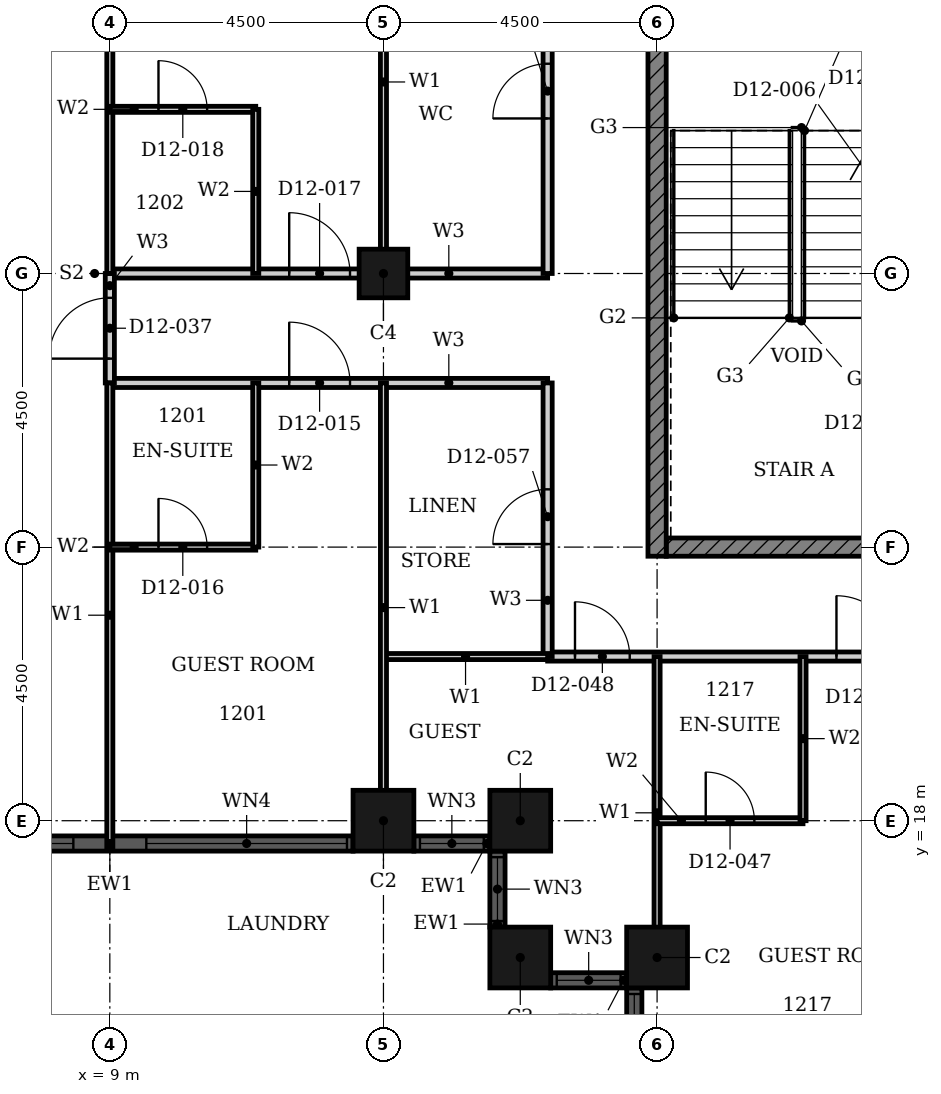
"""IFC4 building model, lengths in metres.
Left out: names, types, materials, properties, quantities, classifications, styles, units other than length and angle.
Written with IfcOpenShell. Run it as: python <this file> out.ifc"""

import sys

from ifc_helpers import new_model, si_unit, direction, frame, frame_2d, origin, origin_2d, place, context, subcontext, project, spatial, rectangle, hollow_rectangle, extrude, element, fill, save


model = new_model("IFC4")
c1 = context("Model", 3, precision=1e-05, world=origin(), true_north=direction((0.0, 1.0)))
c2 = subcontext(c1, "Body", "Model", "MODEL_VIEW")
j1 = project(units=[si_unit("LENGTHUNIT", "METRE"), si_unit("PLANEANGLEUNIT", "RADIAN")], contexts=[c1])
p1 = place(None, origin())
s1 = spatial("IfcSite", under=j1, at=p1, CompositionType="ELEMENT")
p2 = place(p1, origin())
s2 = spatial("IfcBuilding", under=s1, at=p2, CompositionType="ELEMENT")
p3 = place(p2, frame((0.0, 0.0, 56.4)))
s3 = spatial("IfcBuildingStorey", under=s2, at=p3, CompositionType="ELEMENT", Elevation=56.4)
for number, where, z_axis, x_axis in (
    (1, (13.5, 18.0, 0.0), (0.0, 0.0, 1.0), (1.0, 0.0, 0.0)),
    (2, (15.75, 18.0, 0.0), (0.0, 0.0, 1.0), (1.0, 0.0, 0.0)),
    (3, (15.75, 15.75, 0.0), (0.0, 0.0, 1.0), (1.0, 0.0, 0.0)),
    (4, (18.0, 15.75, 0.0), (0.0, 0.0, 1.0), (1.0, 0.0, 0.0)),
):
    element("IfcColumn", number, at=place(p3, frame(where, z_axis=z_axis, x_axis=x_axis)), inside=s3, PredefinedType="COLUMN", context=c2, shape_type="SweptSolid", body=[
        extrude(hollow_rectangle(XDim=1.0, YDim=1.0, WallThickness=0.032, at=origin_2d()), origin(), (0.0, 0.0, 1.0), 3.6),
    ])
p4 = place(p3, frame((13.5, 27.0, 0.0), z_axis=(0.0, 0.0, 1.0), x_axis=(1.0, 0.0, 0.0)))
e5 = element("IfcColumn", 5, at=p4, inside=s3, PredefinedType="COLUMN", context=c2, shape_type="SweptSolid", body=[
    extrude(hollow_rectangle(XDim=0.8, YDim=0.8, WallThickness=0.025, at=origin_2d()), origin(), (0.0, 0.0, 1.0), 3.6),
])
p5 = place(p3, frame((5.0, 17.625, 0.0), z_axis=(0.0, 0.0, 1.0), x_axis=(1.0, 0.0, 0.0)))
e6 = element("IfcWall", 6, at=p5, inside=s3, PredefinedType="SOLIDWALL", context=c2, shape_type="SweptSolid", body=[
    extrude(rectangle(XDim=8.0, YDim=0.25, at=frame_2d((4.0, 0.0))), origin(), (0.0, 0.0, 1.0), 3.6),
])
p6 = place(p5, frame((0.1, 0.0, 0.9)))
e7 = element("IfcOpeningElement", 7, at=p6, cuts=e6, PredefinedType="OPENING", context=c2, shape_type="SweptSolid", body=[
    extrude(rectangle(XDim=3.3, YDim=2.08, at=frame_2d((1.65, 1.04))), frame((0.0, 0.135, 0.0), z_axis=(0.0, -1.0, 0.0), x_axis=(1.0, 0.0, 0.0)), (0.0, 0.0, 1.0), 0.27),
])
p7 = place(p5, frame((4.6, 0.0, 0.9)))
e8 = element("IfcOpeningElement", 8, at=p7, cuts=e6, PredefinedType="OPENING", context=c2, shape_type="SweptSolid", body=[
    extrude(rectangle(XDim=3.3, YDim=2.08, at=frame_2d((1.65, 1.04))), frame((0.0, 0.135, 0.0), z_axis=(0.0, -1.0, 0.0), x_axis=(1.0, 0.0, 0.0)), (0.0, 0.0, 1.0), 0.27),
])
p8 = place(p3, frame((14.0, 17.625, 0.0), z_axis=(0.0, 0.0, 1.0), x_axis=(1.0, 0.0, 0.0)))
e9 = element("IfcWall", 9, at=p8, inside=s3, PredefinedType="SOLIDWALL", context=c2, shape_type="SweptSolid", body=[
    extrude(rectangle(XDim=1.25, YDim=0.25, at=frame_2d((0.625, 0.0))), origin(), (0.0, 0.0, 1.0), 3.6),
])
p9 = place(p8, frame((0.1, 0.0, 0.9)))
e10 = element("IfcOpeningElement", 10, at=p9, cuts=e9, PredefinedType="OPENING", context=c2, shape_type="SweptSolid", body=[
    extrude(rectangle(XDim=1.05, YDim=2.08, at=frame_2d((0.525, 1.04))), frame((0.0, 0.135, 0.0), z_axis=(0.0, -1.0, 0.0), x_axis=(1.0, 0.0, 0.0)), (0.0, 0.0, 1.0), 0.27),
])
p10 = place(p3, frame((15.375, 17.5, 0.0), z_axis=(0.0, 0.0, 1.0), x_axis=(0.0, -1.0, 0.0)))
e11 = element("IfcWall", 11, at=p10, inside=s3, PredefinedType="SOLIDWALL", context=c2, shape_type="SweptSolid", body=[
    extrude(rectangle(XDim=1.25, YDim=0.25, at=frame_2d((0.625, 0.0))), origin(), (0.0, 0.0, 1.0), 3.6),
])
p11 = place(p10, frame((0.1, 0.0, 0.9)))
e12 = element("IfcOpeningElement", 12, at=p11, cuts=e11, PredefinedType="OPENING", context=c2, shape_type="SweptSolid", body=[
    extrude(rectangle(XDim=1.05, YDim=2.08, at=frame_2d((0.525, 1.04))), frame((0.0, 0.135, 0.0), z_axis=(0.0, -1.0, 0.0), x_axis=(1.0, 0.0, 0.0)), (0.0, 0.0, 1.0), 0.27),
])
p12 = place(p3, frame((16.25, 15.375, 0.0), z_axis=(0.0, 0.0, 1.0), x_axis=(1.0, 0.0, 0.0)))
e13 = element("IfcWall", 13, at=p12, inside=s3, PredefinedType="SOLIDWALL", context=c2, shape_type="SweptSolid", body=[
    extrude(rectangle(XDim=1.25, YDim=0.25, at=frame_2d((0.625, 0.0))), origin(), (0.0, 0.0, 1.0), 3.6),
])
p13 = place(p12, frame((0.1, 0.0, 0.9)))
e14 = element("IfcOpeningElement", 14, at=p13, cuts=e13, PredefinedType="OPENING", context=c2, shape_type="SweptSolid", body=[
    extrude(rectangle(XDim=1.05, YDim=2.08, at=frame_2d((0.525, 1.04))), frame((0.0, 0.135, 0.0), z_axis=(0.0, -1.0, 0.0), x_axis=(1.0, 0.0, 0.0)), (0.0, 0.0, 1.0), 0.27),
])
p14 = place(p3, frame((17.625, 15.25, 0.0), z_axis=(0.0, 0.0, 1.0), x_axis=(0.0, -1.0, 0.0)))
e15 = element("IfcWall", 15, at=p14, inside=s3, PredefinedType="SOLIDWALL", context=c2, shape_type="SweptSolid", body=[
    extrude(rectangle(XDim=1.25, YDim=0.25, at=frame_2d((0.625, 0.0))), origin(), (0.0, 0.0, 1.0), 3.6),
])
p15 = place(p14, frame((0.1, 0.0, 0.9)))
e16 = element("IfcOpeningElement", 16, at=p15, cuts=e15, PredefinedType="OPENING", context=c2, shape_type="SweptSolid", body=[
    extrude(rectangle(XDim=1.05, YDim=2.08, at=frame_2d((0.525, 1.04))), frame((0.0, 0.135, 0.0), z_axis=(0.0, -1.0, 0.0), x_axis=(1.0, 0.0, 0.0)), (0.0, 0.0, 1.0), 0.27),
])
p16 = place(p3, frame((18.15, 22.5, 0.0), z_axis=(0.0, 0.0, 1.0), x_axis=(1.0, 0.0, 0.0)))
e17 = element("IfcWall", 17, at=p16, inside=s3, PredefinedType="SHEAR", context=c2, shape_type="SweptSolid", body=[
    extrude(rectangle(XDim=4.225, YDim=0.3, at=frame_2d((2.113, 0.0))), origin(), (0.0, 0.0, 1.0), 3.3),
])
p17 = place(p3, frame((18.0, 22.35, 0.0), z_axis=(0.0, 0.0, 1.0), x_axis=(0.0, 1.0, 0.0)))
e18 = element("IfcWall", 18, at=p17, inside=s3, PredefinedType="SHEAR", context=c2, shape_type="SweptSolid", body=[
    extrude(rectangle(XDim=9.3, YDim=0.3, at=frame_2d((4.65, 0.0))), origin(), (0.0, 0.0, 1.0), 3.3),
])
p18 = place(p3, frame((16.2, 20.7, 0.0), z_axis=(0.0, 0.0, 1.0), x_axis=(1.0, 0.0, 0.0)))
e19 = element("IfcWall", 19, at=p18, inside=s3, PredefinedType="PARTITIONING", context=c2, shape_type="SweptSolid", body=[
    extrude(rectangle(XDim=13.5, YDim=0.15, at=frame_2d((6.75, 0.0))), origin(), (0.0, 0.0, 1.0), 3.3),
])
p19 = place(p18, frame((4.75, 0.0, 0.0)))
e20 = element("IfcOpeningElement", 20, at=p19, cuts=e19, PredefinedType="OPENING", context=c2, shape_type="SweptSolid", body=[
    extrude(rectangle(XDim=1.0, YDim=2.1, at=frame_2d((0.5, 1.05))), frame((0.0, 0.085, 0.0), z_axis=(0.0, -1.0, 0.0), x_axis=(1.0, 0.0, 0.0)), (0.0, 0.0, 1.0), 0.17),
])
p20 = place(p18, frame((0.45, 0.0, 0.0)))
e21 = element("IfcOpeningElement", 21, at=p20, cuts=e19, PredefinedType="OPENING", context=c2, shape_type="SweptSolid", body=[
    extrude(rectangle(XDim=0.9, YDim=2.1, at=frame_2d((0.45, 1.05))), frame((0.0, 0.085, 0.0), z_axis=(0.0, -1.0, 0.0), x_axis=(1.0, 0.0, 0.0)), (0.0, 0.0, 1.0), 0.17),
])
p21 = place(p18, frame((9.45, 0.0, 0.0)))
e22 = element("IfcOpeningElement", 22, at=p21, cuts=e19, PredefinedType="OPENING", context=c2, shape_type="SweptSolid", body=[
    extrude(rectangle(XDim=0.9, YDim=2.1, at=frame_2d((0.45, 1.05))), frame((0.0, 0.085, 0.0), z_axis=(0.0, -1.0, 0.0), x_axis=(1.0, 0.0, 0.0)), (0.0, 0.0, 1.0), 0.17),
])
p22 = place(p3, frame((9.0, 25.2, 0.0), z_axis=(0.0, 0.0, 1.0), x_axis=(1.0, 0.0, 0.0)))
e23 = element("IfcWall", 23, at=p22, inside=s3, PredefinedType="PARTITIONING", context=c2, shape_type="SweptSolid", body=[
    extrude(rectangle(XDim=7.2, YDim=0.15, at=frame_2d((3.6, 0.0))), origin(), (0.0, 0.0, 1.0), 3.3),
])
p23 = place(p22, frame((2.95, 0.0, 0.0)))
e24 = element("IfcOpeningElement", 24, at=p23, cuts=e23, PredefinedType="OPENING", context=c2, shape_type="SweptSolid", body=[
    extrude(rectangle(XDim=1.0, YDim=2.1, at=frame_2d((0.5, 1.05))), frame((0.0, 0.085, 0.0), z_axis=(0.0, -1.0, 0.0), x_axis=(1.0, 0.0, 0.0)), (0.0, 0.0, 1.0), 0.17),
])
p24 = place(p3, frame((9.0, 27.0, 0.0), z_axis=(0.0, 0.0, 1.0), x_axis=(1.0, 0.0, 0.0)))
e25 = element("IfcWall", 25, at=p24, inside=s3, PredefinedType="PARTITIONING", context=c2, shape_type="SweptSolid", body=[
    extrude(rectangle(XDim=7.2, YDim=0.15, at=frame_2d((3.6, 0.0))), origin(), (0.0, 0.0, 1.0), 2.58),
])
p25 = place(p24, frame((2.95, 0.0, 0.0)))
e26 = element("IfcOpeningElement", 26, at=p25, cuts=e25, PredefinedType="OPENING", context=c2, shape_type="SweptSolid", body=[
    extrude(rectangle(XDim=1.0, YDim=2.1, at=frame_2d((0.5, 1.05))), frame((0.0, 0.085, 0.0), z_axis=(0.0, -1.0, 0.0), x_axis=(1.0, 0.0, 0.0)), (0.0, 0.0, 1.0), 0.17),
])
p26 = place(p3, frame((16.2, 27.0, 0.0), z_axis=(0.0, 0.0, 1.0), x_axis=(0.0, 1.0, 0.0)))
e27 = element("IfcWall", 27, at=p26, inside=s3, PredefinedType="PARTITIONING", context=c2, shape_type="SweptSolid", body=[
    extrude(rectangle(XDim=6.3, YDim=0.15, at=frame_2d((3.15, 0.0))), origin(), (0.0, 0.0, 1.0), 3.3),
])
p27 = place(p26, frame((2.55, 0.0, 0.0)))
e28 = element("IfcOpeningElement", 28, at=p27, cuts=e27, PredefinedType="OPENING", context=c2, shape_type="SweptSolid", body=[
    extrude(rectangle(XDim=0.9, YDim=2.1, at=frame_2d((0.45, 1.05))), frame((0.0, 0.085, 0.0), z_axis=(0.0, -1.0, 0.0), x_axis=(1.0, 0.0, 0.0)), (0.0, 0.0, 1.0), 0.17),
])
p28 = place(p3, frame((16.2, 20.7, 0.0), z_axis=(0.0, 0.0, 1.0), x_axis=(0.0, 1.0, 0.0)))
e29 = element("IfcWall", 29, at=p28, inside=s3, PredefinedType="PARTITIONING", context=c2, shape_type="SweptSolid", body=[
    extrude(rectangle(XDim=4.5, YDim=0.15, at=frame_2d((2.25, 0.0))), origin(), (0.0, 0.0, 1.0), 3.3),
])
p29 = place(p28, frame((1.85, 0.0, 0.0)))
e30 = element("IfcOpeningElement", 30, at=p29, cuts=e29, PredefinedType="OPENING", context=c2, shape_type="SweptSolid", body=[
    extrude(rectangle(XDim=0.9, YDim=2.1, at=frame_2d((0.45, 1.05))), frame((0.0, 0.085, 0.0), z_axis=(0.0, -1.0, 0.0), x_axis=(1.0, 0.0, 0.0)), (0.0, 0.0, 1.0), 0.17),
])
p30 = place(p3, frame((9.0, 25.2, 0.0), z_axis=(0.0, 0.0, 1.0), x_axis=(0.0, 1.0, 0.0)))
e31 = element("IfcWall", 31, at=p30, inside=s3, PredefinedType="PARTITIONING", context=c2, shape_type="SweptSolid", body=[
    extrude(rectangle(XDim=1.8, YDim=0.15, at=frame_2d((0.9, 0.0))), origin(), (0.0, 0.0, 1.0), 3.3),
])
p31 = place(p30, frame((0.4, 0.0, 0.0)))
e32 = element("IfcOpeningElement", 32, at=p31, cuts=e31, PredefinedType="OPENING", context=c2, shape_type="SweptSolid", body=[
    extrude(rectangle(XDim=1.0, YDim=2.1, at=frame_2d((0.5, 1.05))), frame((0.0, 0.085, 0.0), z_axis=(0.0, -1.0, 0.0), x_axis=(1.0, 0.0, 0.0)), (0.0, 0.0, 1.0), 0.17),
])
p32 = place(p3, frame((13.5, 20.7, 0.0), z_axis=(0.0, 0.0, 1.0), x_axis=(1.0, 0.0, 0.0)))
e33 = element("IfcWall", 33, at=p32, inside=s3, PredefinedType="PARTITIONING", context=c2, shape_type="SweptSolid", body=[
    extrude(rectangle(XDim=2.7, YDim=0.1, at=frame_2d((1.35, 0.0))), origin(), (0.0, 0.0, 1.0), 3.3),
])
p33 = place(p3, frame((13.5, 27.0, 0.0), z_axis=(0.0, 0.0, 1.0), x_axis=(0.0, 1.0, 0.0)))
e34 = element("IfcWall", 34, at=p33, inside=s3, PredefinedType="PARTITIONING", context=c2, shape_type="SweptSolid", body=[
    extrude(rectangle(XDim=6.3, YDim=0.1, at=frame_2d((3.15, 0.0))), origin(), (0.0, 0.0, 1.0), 2.38),
])
p34 = place(p3, frame((13.5, 17.81, 0.0), z_axis=(0.0, 0.0, 1.0), x_axis=(0.0, 1.0, 0.0)))
e35 = element("IfcWall", 35, at=p34, inside=s3, PredefinedType="PARTITIONING", context=c2, shape_type="SweptSolid", body=[
    extrude(rectangle(XDim=7.39, YDim=0.1, at=frame_2d((3.695, 0.0))), origin(), (0.0, 0.0, 1.0), 2.38),
])
p35 = place(p3, frame((18.0, 15.56, 0.0), z_axis=(0.0, 0.0, 1.0), x_axis=(0.0, 1.0, 0.0)))
e36 = element("IfcWall", 36, at=p35, inside=s3, PredefinedType="PARTITIONING", context=c2, shape_type="SweptSolid", body=[
    extrude(rectangle(XDim=5.14, YDim=0.1, at=frame_2d((2.57, 0.0))), origin(), (0.0, 0.0, 1.0), 3.3),
])
p36 = place(p3, frame((9.0, 27.0, 0.0), z_axis=(0.0, 0.0, 1.0), x_axis=(0.0, 1.0, 0.0)))
e37 = element("IfcWall", 37, at=p36, inside=s3, PredefinedType="PARTITIONING", context=c2, shape_type="SweptSolid", body=[
    extrude(rectangle(XDim=9.44, YDim=0.1, at=frame_2d((4.72, 0.0))), origin(), (0.0, 0.0, 1.0), 3.3),
])
p37 = place(p3, frame((9.0, 17.56, 0.0), z_axis=(0.0, 0.0, 1.0), x_axis=(0.0, 1.0, 0.0)))
e38 = element("IfcWall", 38, at=p37, inside=s3, PredefinedType="PARTITIONING", context=c2, shape_type="SweptSolid", body=[
    extrude(rectangle(XDim=7.64, YDim=0.1, at=frame_2d((3.82, 0.0))), origin(), (0.0, 0.0, 1.0), 3.3),
])
p38 = place(p3, frame((18.0, 18.0, 0.0), z_axis=(0.0, 0.0, 1.0), x_axis=(1.0, 0.0, 0.0)))
e39 = element("IfcWall", 39, at=p38, inside=s3, PredefinedType="PARTITIONING", context=c2, shape_type="SweptSolid", body=[
    extrude(rectangle(XDim=2.4, YDim=0.1, at=frame_2d((1.2, 0.0))), origin(), (0.0, 0.0, 1.0), 3.3),
])
p39 = place(p38, frame((0.8, 0.0, 0.0)))
e40 = element("IfcOpeningElement", 40, at=p39, cuts=e39, PredefinedType="OPENING", context=c2, shape_type="SweptSolid", body=[
    extrude(rectangle(XDim=0.8, YDim=2.1, at=frame_2d((0.4, 1.05))), frame((0.0, 0.06, 0.0), z_axis=(0.0, -1.0, 0.0), x_axis=(1.0, 0.0, 0.0)), (0.0, 0.0, 1.0), 0.12),
])
p40 = place(p3, frame((9.0, 22.5, 0.0), z_axis=(0.0, 0.0, 1.0), x_axis=(1.0, 0.0, 0.0)))
e41 = element("IfcWall", 41, at=p40, inside=s3, PredefinedType="PARTITIONING", context=c2, shape_type="SweptSolid", body=[
    extrude(rectangle(XDim=2.4, YDim=0.1, at=frame_2d((1.2, 0.0))), origin(), (0.0, 0.0, 1.0), 2.58),
])
p41 = place(p40, frame((0.8, 0.0, 0.0)))
e42 = element("IfcOpeningElement", 42, at=p41, cuts=e41, PredefinedType="OPENING", context=c2, shape_type="SweptSolid", body=[
    extrude(rectangle(XDim=0.8, YDim=2.1, at=frame_2d((0.4, 1.05))), frame((0.0, 0.06, 0.0), z_axis=(0.0, -1.0, 0.0), x_axis=(1.0, 0.0, 0.0)), (0.0, 0.0, 1.0), 0.12),
])
p42 = place(p3, frame((9.0, 29.7, 0.0), z_axis=(0.0, 0.0, 1.0), x_axis=(1.0, 0.0, 0.0)))
e43 = element("IfcWall", 43, at=p42, inside=s3, PredefinedType="PARTITIONING", context=c2, shape_type="SweptSolid", body=[
    extrude(rectangle(XDim=2.4, YDim=0.1, at=frame_2d((1.2, 0.0))), origin(), (0.0, 0.0, 1.0), 3.3),
])
p43 = place(p42, frame((0.8, 0.0, 0.0)))
e44 = element("IfcOpeningElement", 44, at=p43, cuts=e43, PredefinedType="OPENING", context=c2, shape_type="SweptSolid", body=[
    extrude(rectangle(XDim=0.8, YDim=2.1, at=frame_2d((0.4, 1.05))), frame((0.0, 0.06, 0.0), z_axis=(0.0, -1.0, 0.0), x_axis=(1.0, 0.0, 0.0)), (0.0, 0.0, 1.0), 0.12),
])
for number, where, z_axis, x_axis in (
    (45, (11.4, 27.0, 0.0), (0.0, 0.0, 1.0), (0.0, 1.0, 0.0)),
    (46, (11.4, 22.5, 0.0), (0.0, 0.0, 1.0), (0.0, 1.0, 0.0)),
    (47, (20.4, 18.0, 0.0), (0.0, 0.0, 1.0), (0.0, 1.0, 0.0)),
):
    element("IfcWall", number, at=place(p3, frame(where, z_axis=z_axis, x_axis=x_axis)), inside=s3, PredefinedType="PARTITIONING", context=c2, shape_type="SweptSolid", body=[
        extrude(rectangle(XDim=2.7, YDim=0.1, at=frame_2d((1.35, 0.0))), origin(), (0.0, 0.0, 1.0), 3.3),
    ])
p44 = place(p6, origin())
e48 = element("IfcWindow", 48, at=p44, inside=s3, PartitioningType="SINGLE_PANEL", PredefinedType="WINDOW", context=c2, shape_type="SweptSolid", body=[
    extrude(rectangle(XDim=3.3, YDim=2.08, at=frame_2d((1.65, 1.04))), frame((0.0, 0.03, 0.0), z_axis=(0.0, -1.0, 0.0), x_axis=(1.0, 0.0, 0.0)), (0.0, 0.0, 1.0), 0.06),
])
fill(e7, e48)
p45 = place(p7, origin())
e49 = element("IfcWindow", 49, at=p45, inside=s3, PartitioningType="SINGLE_PANEL", PredefinedType="WINDOW", context=c2, shape_type="SweptSolid", body=[
    extrude(rectangle(XDim=3.3, YDim=2.08, at=frame_2d((1.65, 1.04))), frame((0.0, 0.03, 0.0), z_axis=(0.0, -1.0, 0.0), x_axis=(1.0, 0.0, 0.0)), (0.0, 0.0, 1.0), 0.06),
])
fill(e8, e49)
p46 = place(p9, origin())
e50 = element("IfcWindow", 50, at=p46, inside=s3, PartitioningType="SINGLE_PANEL", PredefinedType="WINDOW", context=c2, shape_type="SweptSolid", body=[
    extrude(rectangle(XDim=1.05, YDim=2.08, at=frame_2d((0.525, 1.04))), frame((0.0, 0.03, 0.0), z_axis=(0.0, -1.0, 0.0), x_axis=(1.0, 0.0, 0.0)), (0.0, 0.0, 1.0), 0.06),
])
fill(e10, e50)
p47 = place(p11, origin())
e51 = element("IfcWindow", 51, at=p47, inside=s3, PartitioningType="SINGLE_PANEL", PredefinedType="WINDOW", context=c2, shape_type="SweptSolid", body=[
    extrude(rectangle(XDim=1.05, YDim=2.08, at=frame_2d((0.525, 1.04))), frame((0.0, 0.03, 0.0), z_axis=(0.0, -1.0, 0.0), x_axis=(1.0, 0.0, 0.0)), (0.0, 0.0, 1.0), 0.06),
])
fill(e12, e51)
p48 = place(p13, origin())
e52 = element("IfcWindow", 52, at=p48, inside=s3, PartitioningType="SINGLE_PANEL", PredefinedType="WINDOW", context=c2, shape_type="SweptSolid", body=[
    extrude(rectangle(XDim=1.05, YDim=2.08, at=frame_2d((0.525, 1.04))), frame((0.0, 0.03, 0.0), z_axis=(0.0, -1.0, 0.0), x_axis=(1.0, 0.0, 0.0)), (0.0, 0.0, 1.0), 0.06),
])
fill(e14, e52)
p49 = place(p15, origin())
e53 = element("IfcWindow", 53, at=p49, inside=s3, PartitioningType="SINGLE_PANEL", PredefinedType="WINDOW", context=c2, shape_type="SweptSolid", body=[
    extrude(rectangle(XDim=1.05, YDim=2.08, at=frame_2d((0.525, 1.04))), frame((0.0, 0.03, 0.0), z_axis=(0.0, -1.0, 0.0), x_axis=(1.0, 0.0, 0.0)), (0.0, 0.0, 1.0), 0.06),
])
fill(e16, e53)
p50 = place(p23, origin())
e54 = element("IfcDoor", 54, at=p50, inside=s3, OperationType="SINGLE_SWING_RIGHT", PredefinedType="DOOR", context=c2, shape_type="SweptSolid", body=[
    extrude(rectangle(XDim=1.0, YDim=2.1, at=frame_2d((0.5, 1.05))), frame((0.0, 0.025, 0.0), z_axis=(0.0, -1.0, 0.0), x_axis=(1.0, 0.0, 0.0)), (0.0, 0.0, 1.0), 0.05),
])
fill(e24, e54)
p51 = place(p41, origin())
e55 = element("IfcDoor", 55, at=p51, inside=s3, OperationType="SINGLE_SWING_RIGHT", PredefinedType="DOOR", context=c2, shape_type="SweptSolid", body=[
    extrude(rectangle(XDim=0.8, YDim=2.1, at=frame_2d((0.4, 1.05))), frame((0.0, 0.025, 0.0), z_axis=(0.0, -1.0, 0.0), x_axis=(1.0, 0.0, 0.0)), (0.0, 0.0, 1.0), 0.05),
])
fill(e42, e55)
p52 = place(p25, origin())
e56 = element("IfcDoor", 56, at=p52, inside=s3, OperationType="SINGLE_SWING_RIGHT", PredefinedType="DOOR", context=c2, shape_type="SweptSolid", body=[
    extrude(rectangle(XDim=1.0, YDim=2.1, at=frame_2d((0.5, 1.05))), frame((0.0, 0.025, 0.0), z_axis=(0.0, -1.0, 0.0), x_axis=(1.0, 0.0, 0.0)), (0.0, 0.0, 1.0), 0.05),
])
fill(e26, e56)
p53 = place(p43, origin())
e57 = element("IfcDoor", 57, at=p53, inside=s3, OperationType="SINGLE_SWING_LEFT", PredefinedType="DOOR", context=c2, shape_type="SweptSolid", body=[
    extrude(rectangle(XDim=0.8, YDim=2.1, at=frame_2d((0.4, 1.05))), frame((0.0, 0.025, 0.0), z_axis=(0.0, -1.0, 0.0), x_axis=(1.0, 0.0, 0.0)), (0.0, 0.0, 1.0), 0.05),
])
fill(e44, e57)
p54 = place(p31, origin())
e58 = element("IfcDoor", 58, at=p54, inside=s3, OperationType="SINGLE_SWING_LEFT", PredefinedType="DOOR", context=c2, shape_type="SweptSolid", body=[
    extrude(rectangle(XDim=1.0, YDim=2.1, at=frame_2d((0.5, 1.05))), frame((0.0, 0.025, 0.0), z_axis=(0.0, -1.0, 0.0), x_axis=(1.0, 0.0, 0.0)), (0.0, 0.0, 1.0), 0.05),
])
fill(e32, e58)
p55 = place(p19, origin())
e59 = element("IfcDoor", 59, at=p55, inside=s3, OperationType="SINGLE_SWING_RIGHT", PredefinedType="DOOR", context=c2, shape_type="SweptSolid", body=[
    extrude(rectangle(XDim=1.0, YDim=2.1, at=frame_2d((0.5, 1.05))), frame((0.0, 0.025, 0.0), z_axis=(0.0, -1.0, 0.0), x_axis=(1.0, 0.0, 0.0)), (0.0, 0.0, 1.0), 0.05),
])
fill(e20, e59)
p56 = place(p39, origin())
e60 = element("IfcDoor", 60, at=p56, inside=s3, OperationType="SINGLE_SWING_RIGHT", PredefinedType="DOOR", context=c2, shape_type="SweptSolid", body=[
    extrude(rectangle(XDim=0.8, YDim=2.1, at=frame_2d((0.4, 1.05))), frame((0.0, 0.025, 0.0), z_axis=(0.0, -1.0, 0.0), x_axis=(1.0, 0.0, 0.0)), (0.0, 0.0, 1.0), 0.05),
])
fill(e40, e60)
p57 = place(p20, origin())
e61 = element("IfcDoor", 61, at=p57, inside=s3, OperationType="SINGLE_SWING_RIGHT", PredefinedType="DOOR", context=c2, shape_type="SweptSolid", body=[
    extrude(rectangle(XDim=0.9, YDim=2.1, at=frame_2d((0.45, 1.05))), frame((0.0, 0.025, 0.0), z_axis=(0.0, -1.0, 0.0), x_axis=(1.0, 0.0, 0.0)), (0.0, 0.0, 1.0), 0.05),
])
fill(e21, e61)
p58 = place(p29, origin())
e62 = element("IfcDoor", 62, at=p58, inside=s3, OperationType="SINGLE_SWING_LEFT", PredefinedType="DOOR", context=c2, shape_type="SweptSolid", body=[
    extrude(rectangle(XDim=0.9, YDim=2.1, at=frame_2d((0.45, 1.05))), frame((0.0, 0.025, 0.0), z_axis=(0.0, -1.0, 0.0), x_axis=(1.0, 0.0, 0.0)), (0.0, 0.0, 1.0), 0.05),
])
fill(e30, e62)
p59 = place(p27, origin())
e63 = element("IfcDoor", 63, at=p59, inside=s3, OperationType="SINGLE_SWING_LEFT", PredefinedType="DOOR", context=c2, shape_type="SweptSolid", body=[
    extrude(rectangle(XDim=0.9, YDim=2.1, at=frame_2d((0.45, 1.05))), frame((0.0, 0.025, 0.0), z_axis=(0.0, -1.0, 0.0), x_axis=(1.0, 0.0, 0.0)), (0.0, 0.0, 1.0), 0.05),
])
fill(e28, e63)
save(model, sys.argv[1])
